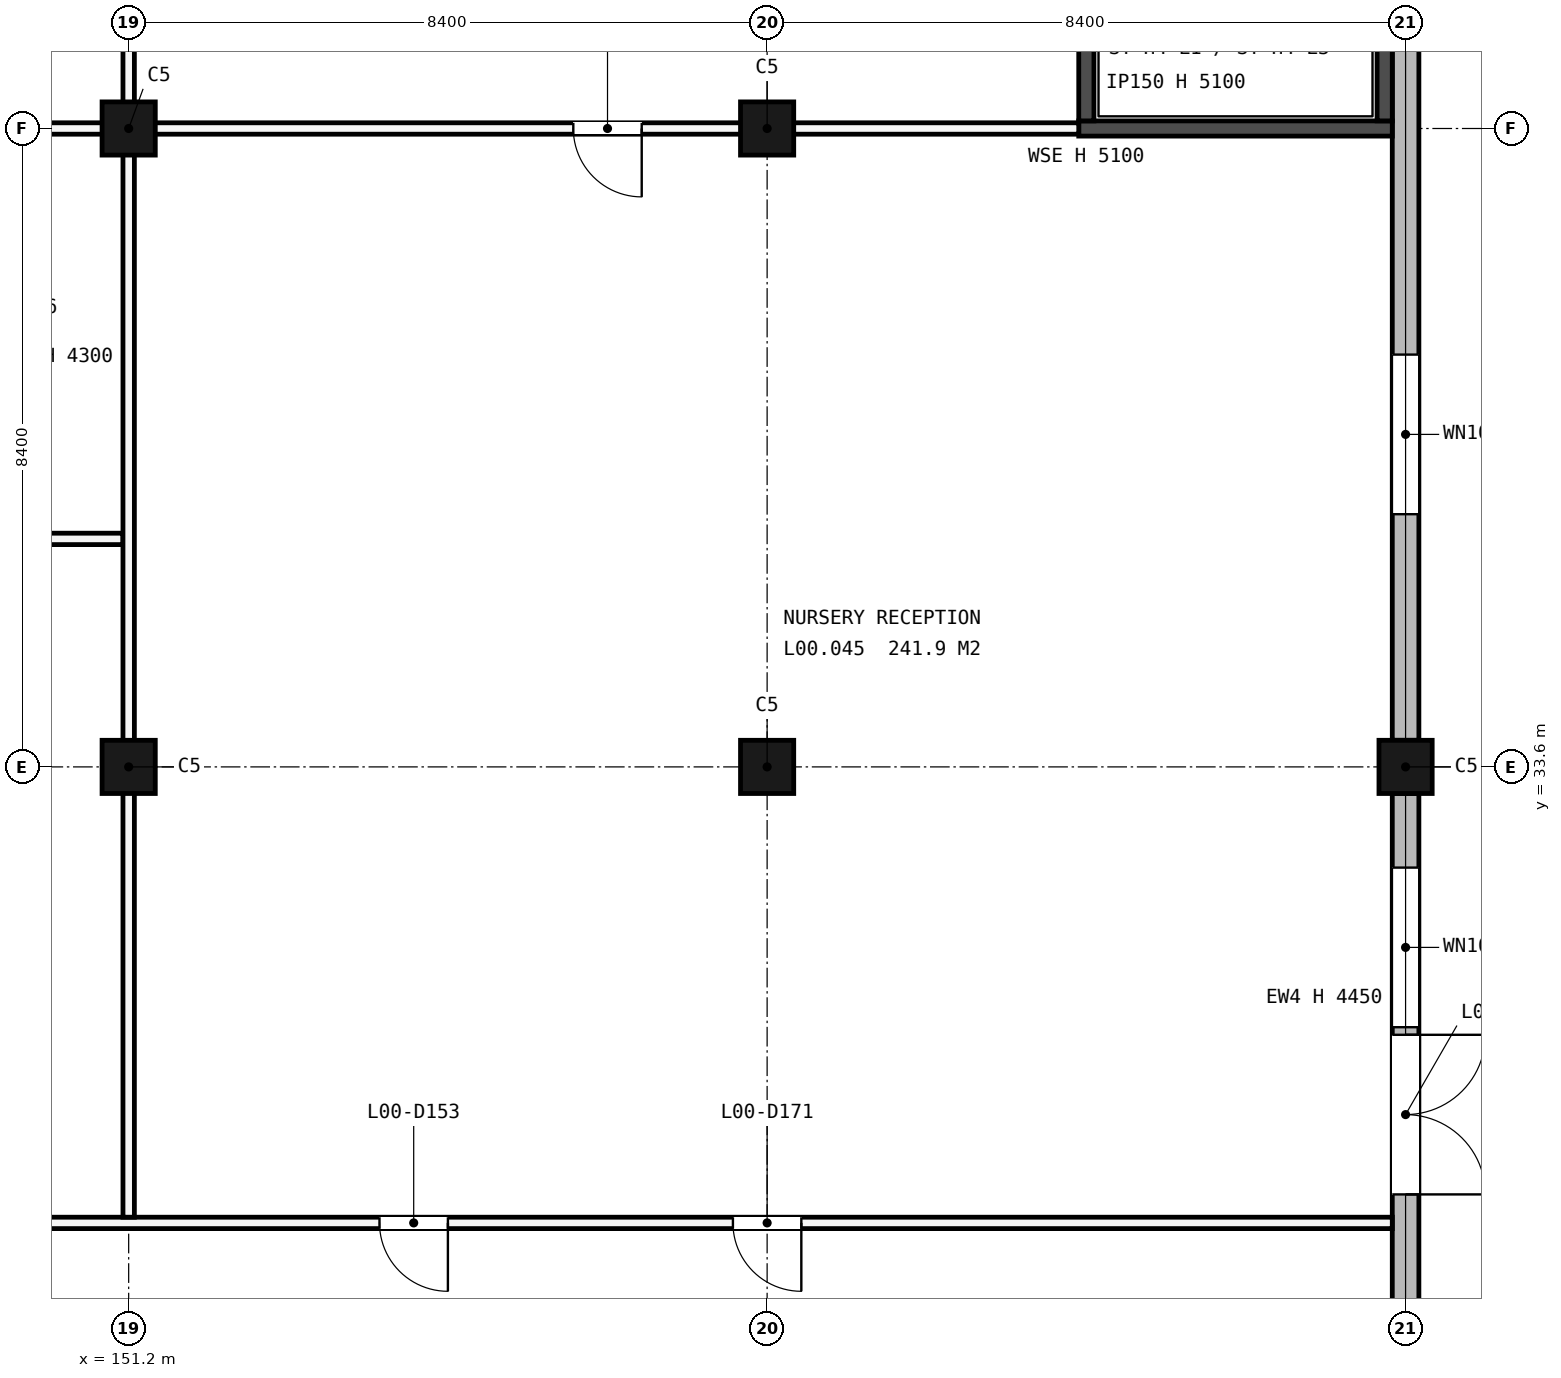
"""IFC4 building model, lengths in metres.
Left out: names, types, materials, properties, quantities, classifications, styles, units other than length and angle.
Written with IfcOpenShell. Run it as: python <this file> out.ifc"""

import sys

from ifc_helpers import new_model, si_unit, direction, frame, frame_2d, origin, origin_2d, place, context, subcontext, project, spatial, rectangle, extrude, element, fill, save


model = new_model("IFC4")
c1 = context("Model", 3, precision=1e-05, world=origin(), true_north=direction((0.0, 1.0)))
c2 = subcontext(c1, "Body", "Model", "MODEL_VIEW")
j1 = project(units=[si_unit("LENGTHUNIT", "METRE"), si_unit("PLANEANGLEUNIT", "RADIAN")], contexts=[c1])
p1 = place(None, origin())
s1 = spatial("IfcSite", under=j1, at=p1, CompositionType="ELEMENT")
p2 = place(p1, origin())
s2 = spatial("IfcBuilding", under=s1, at=p2, CompositionType="ELEMENT")
p3 = place(p2, origin())
s3 = spatial("IfcBuildingStorey", under=s2, at=p3, CompositionType="ELEMENT", Elevation=0.0)
for number, where, z_axis, x_axis in (
    (1, (151.2, 33.6, -0.3), (0.0, 0.0, 1.0), (1.0, 0.0, 0.0)),
    (2, (151.2, 42.0, -0.3), (0.0, 0.0, 1.0), (1.0, 0.0, 0.0)),
    (3, (159.6, 33.6, -0.3), (0.0, 0.0, 1.0), (1.0, 0.0, 0.0)),
    (4, (159.6, 42.0, -0.3), (0.0, 0.0, 1.0), (1.0, 0.0, 0.0)),
    (5, (168.0, 33.6, -0.3), (0.0, 0.0, 1.0), (1.0, 0.0, 0.0)),
):
    element("IfcColumn", number, at=place(p3, frame(where, z_axis=z_axis, x_axis=x_axis)), inside=s3, PredefinedType="COLUMN", context=c2, shape_type="SweptSolid", body=[
        extrude(rectangle(XDim=0.7, YDim=0.7, at=origin_2d()), origin(), (0.0, 0.0, 1.0), 5.4),
    ])
p4 = place(p3, frame((168.0, 25.55, 0.0), z_axis=(0.0, 0.0, 1.0), x_axis=(0.0, 1.0, 0.0)))
e6 = element("IfcWall", 6, at=p4, inside=s3, PredefinedType="STANDARD", context=c2, shape_type="SweptSolid", body=[
    extrude(rectangle(XDim=7.7, YDim=0.35, at=frame_2d((3.85, 0.0))), origin(), (0.0, 0.0, 1.0), 4.45),
])
p5 = place(p4, frame((4.525, 0.0, 0.0), z_axis=(0.0, 0.0, 1.0), x_axis=(-1.0, 0.0, 0.0)))
e7 = element("IfcOpeningElement", 7, at=p5, cuts=e6, PredefinedType="OPENING", context=c2, shape_type="SweptSolid", body=[
    extrude(rectangle(XDim=2.1, YDim=2.2, at=frame_2d((1.05, 1.1))), frame((0.0, 0.185, 0.0), z_axis=(0.0, -1.0, 0.0), x_axis=(1.0, 0.0, 0.0)), (0.0, 0.0, 1.0), 0.37),
])
p6 = place(p4, frame((4.625, 0.0, 0.6)))
e8 = element("IfcOpeningElement", 8, at=p6, cuts=e6, PredefinedType="OPENING", context=c2, shape_type="SweptSolid", body=[
    extrude(rectangle(XDim=2.1, YDim=1.8, at=frame_2d((1.05, 0.9))), frame((0.0, 0.185, 0.0), z_axis=(0.0, -1.0, 0.0), x_axis=(1.0, 0.0, 0.0)), (0.0, 0.0, 1.0), 0.37),
])
p7 = place(p3, frame((168.0, 33.95, 0.0), z_axis=(0.0, 0.0, 1.0), x_axis=(0.0, 1.0, 0.0)))
e9 = element("IfcWall", 9, at=p7, inside=s3, PredefinedType="STANDARD", context=c2, shape_type="SweptSolid", body=[
    extrude(rectangle(XDim=16.45, YDim=0.35, at=frame_2d((8.225, 0.0))), origin(), (0.0, 0.0, 1.0), 5.1),
])
p8 = place(p7, frame((2.975, 0.0, 0.6)))
e10 = element("IfcOpeningElement", 10, at=p8, cuts=e9, PredefinedType="OPENING", context=c2, shape_type="SweptSolid", body=[
    extrude(rectangle(XDim=2.1, YDim=1.8, at=frame_2d((1.05, 0.9))), frame((0.0, 0.185, 0.0), z_axis=(0.0, -1.0, 0.0), x_axis=(1.0, 0.0, 0.0)), (0.0, 0.0, 1.0), 0.37),
])
p9 = place(p3, frame((163.7, 42.0, 0.0), z_axis=(0.0, 0.0, 1.0), x_axis=(1.0, 0.0, 0.0)))
e11 = element("IfcWall", 11, at=p9, inside=s3, PredefinedType="SHEAR", context=c2, shape_type="SweptSolid", body=[
    extrude(rectangle(XDim=4.125, YDim=0.2, at=frame_2d((2.062, 0.0))), origin(), (0.0, 0.0, 1.0), 5.1),
])
for number, where, z_axis, x_axis in (
    (12, (163.8, 42.1, 0.0), (0.0, 0.0, 1.0), (0.0, 1.0, 0.0)),
    (13, (167.725, 42.1, 0.0), (0.0, 0.0, 1.0), (0.0, 1.0, 0.0)),
):
    element("IfcWall", number, at=place(p3, frame(where, z_axis=z_axis, x_axis=x_axis)), inside=s3, PredefinedType="SHEAR", context=c2, shape_type="SweptSolid", body=[
        extrude(rectangle(XDim=7.925, YDim=0.2, at=frame_2d((3.962, 0.0))), origin(), (0.0, 0.0, 1.0), 5.1),
    ])
p10 = place(p3, frame((117.475, 27.6, 0.0), z_axis=(0.0, 0.0, 1.0), x_axis=(1.0, 0.0, 0.0)))
e14 = element("IfcWall", 14, at=p10, inside=s3, PredefinedType="PARTITIONING", context=c2, shape_type="SweptSolid", body=[
    extrude(rectangle(XDim=50.35, YDim=0.15, at=frame_2d((25.175, 0.0))), origin(), (0.0, 0.0, 1.0), 5.1),
])
p11 = place(p10, frame((7.475, 0.0, 0.0)))
e15 = element("IfcOpeningElement", 15, at=p11, cuts=e14, PredefinedType="OPENING", context=c2, shape_type="SweptSolid", body=[
    extrude(rectangle(XDim=2.1, YDim=2.1, at=frame_2d((1.05, 1.05))), frame((0.0, 0.085, 0.0), z_axis=(0.0, -1.0, 0.0), x_axis=(1.0, 0.0, 0.0)), (0.0, 0.0, 1.0), 0.17),
])
p12 = place(p10, frame((20.675, 0.0, 0.0)))
e16 = element("IfcOpeningElement", 16, at=p12, cuts=e14, PredefinedType="OPENING", context=c2, shape_type="SweptSolid", body=[
    extrude(rectangle(XDim=0.9, YDim=2.25, at=frame_2d((0.45, 1.125))), frame((0.0, 0.085, 0.0), z_axis=(0.0, -1.0, 0.0), x_axis=(1.0, 0.0, 0.0)), (0.0, 0.0, 1.0), 0.17),
])
p13 = place(p10, frame((29.075, 0.0, 0.0)))
e17 = element("IfcOpeningElement", 17, at=p13, cuts=e14, PredefinedType="OPENING", context=c2, shape_type="SweptSolid", body=[
    extrude(rectangle(XDim=0.9, YDim=2.25, at=frame_2d((0.45, 1.125))), frame((0.0, 0.085, 0.0), z_axis=(0.0, -1.0, 0.0), x_axis=(1.0, 0.0, 0.0)), (0.0, 0.0, 1.0), 0.17),
])
p14 = place(p10, frame((41.675, 0.0, 0.0)))
e18 = element("IfcOpeningElement", 18, at=p14, cuts=e14, PredefinedType="OPENING", context=c2, shape_type="SweptSolid", body=[
    extrude(rectangle(XDim=0.9, YDim=2.25, at=frame_2d((0.45, 1.125))), frame((0.0, 0.085, 0.0), z_axis=(0.0, -1.0, 0.0), x_axis=(1.0, 0.0, 0.0)), (0.0, 0.0, 1.0), 0.17),
])
p15 = place(p10, frame((37.025, 0.0, 0.0)))
e19 = element("IfcOpeningElement", 19, at=p15, cuts=e14, PredefinedType="OPENING", context=c2, shape_type="SweptSolid", body=[
    extrude(rectangle(XDim=0.9, YDim=2.25, at=frame_2d((0.45, 1.125))), frame((0.0, 0.085, 0.0), z_axis=(0.0, -1.0, 0.0), x_axis=(1.0, 0.0, 0.0)), (0.0, 0.0, 1.0), 0.17),
])
p16 = place(p3, frame((142.875, 36.6, 0.0), z_axis=(0.0, 0.0, 1.0), x_axis=(1.0, 0.0, 0.0)))
e20 = element("IfcWall", 20, at=p16, inside=s3, PredefinedType="PARTITIONING", context=c2, shape_type="SweptSolid", body=[
    extrude(rectangle(XDim=8.25, YDim=0.15, at=frame_2d((4.125, 0.0))), origin(), (0.0, 0.0, 1.0), 5.1),
])
p17 = place(p3, frame((143.13, 42.0, 0.0), z_axis=(0.0, 0.0, 1.0), x_axis=(1.0, 0.0, 0.0)))
e21 = element("IfcWall", 21, at=p17, inside=s3, PredefinedType="PARTITIONING", context=c2, shape_type="SweptSolid", body=[
    extrude(rectangle(XDim=16.14, YDim=0.15, at=frame_2d((8.07, 0.0))), origin(), (0.0, 0.0, 1.0), 4.3),
])
p18 = place(p17, frame((3.42, 0.0, 0.0)))
e22 = element("IfcOpeningElement", 22, at=p18, cuts=e21, PredefinedType="OPENING", context=c2, shape_type="SweptSolid", body=[
    extrude(rectangle(XDim=0.9, YDim=2.1, at=frame_2d((0.45, 1.05))), frame((0.0, 0.085, 0.0), z_axis=(0.0, -1.0, 0.0), x_axis=(1.0, 0.0, 0.0)), (0.0, 0.0, 1.0), 0.17),
])
p19 = place(p17, frame((13.92, 0.0, 0.0)))
e23 = element("IfcOpeningElement", 23, at=p19, cuts=e21, PredefinedType="OPENING", context=c2, shape_type="SweptSolid", body=[
    extrude(rectangle(XDim=0.9, YDim=2.25, at=frame_2d((0.45, 1.125))), frame((0.0, 0.085, 0.0), z_axis=(0.0, -1.0, 0.0), x_axis=(1.0, 0.0, 0.0)), (0.0, 0.0, 1.0), 0.17),
])
p20 = place(p3, frame((159.27, 42.0, 0.0), z_axis=(0.0, 0.0, 1.0), x_axis=(1.0, 0.0, 0.0)))
e24 = element("IfcWall", 24, at=p20, inside=s3, PredefinedType="PARTITIONING", context=c2, shape_type="SweptSolid", body=[
    extrude(rectangle(XDim=4.43, YDim=0.15, at=frame_2d((2.215, 0.0))), origin(), (0.0, 0.0, 1.0), 5.1),
])
p21 = place(p3, frame((151.2, 27.675, 0.0), z_axis=(0.0, 0.0, 1.0), x_axis=(0.0, 1.0, 0.0)))
e25 = element("IfcWall", 25, at=p21, inside=s3, PredefinedType="PARTITIONING", context=c2, shape_type="SweptSolid", body=[
    extrude(rectangle(XDim=22.65, YDim=0.15, at=frame_2d((11.325, 0.0))), origin(), (0.0, 0.0, 1.0), 4.3),
])
p22 = place(p5, origin())
e26 = element("IfcDoor", 26, at=p22, inside=s3, OperationType="SINGLE_SWING_LEFT", PredefinedType="DOOR", context=c2, shape_type="SweptSolid", body=[
    extrude(rectangle(XDim=2.1, YDim=0.013, at=frame_2d((1.05, 0.007))), frame((0.0, 0.115, 0.0), z_axis=(0.0, -1.0, 0.0), x_axis=(1.0, 0.0, 0.0)), (0.0, 0.0, 1.0), 0.23),
    extrude(rectangle(XDim=0.075, YDim=2.112, at=frame_2d((0.038, 1.069))), frame((0.0, 0.125, 0.0), z_axis=(0.0, -1.0, 0.0), x_axis=(1.0, 0.0, 0.0)), (0.0, 0.0, 1.0), 0.25),
    extrude(rectangle(XDim=0.075, YDim=2.112, at=frame_2d((2.062, 1.069))), frame((0.0, 0.125, 0.0), z_axis=(0.0, -1.0, 0.0), x_axis=(1.0, 0.0, 0.0)), (0.0, 0.0, 1.0), 0.25),
    extrude(rectangle(XDim=2.1, YDim=0.075, at=frame_2d((1.05, 2.163))), frame((0.0, 0.115, 0.0), z_axis=(0.0, -1.0, 0.0), x_axis=(1.0, 0.0, 0.0)), (0.0, 0.0, 1.0), 0.23),
    extrude(rectangle(XDim=1.95, YDim=0.3, at=frame_2d((1.05, 0.163))), frame((0.0, 0.02, 0.0), z_axis=(0.0, -1.0, 0.0), x_axis=(1.0, 0.0, 0.0)), (0.0, 0.0, 1.0), 0.04),
    extrude(rectangle(XDim=1.95, YDim=0.12, at=frame_2d((1.05, 2.065))), frame((0.0, 0.02, 0.0), z_axis=(0.0, -1.0, 0.0), x_axis=(1.0, 0.0, 0.0)), (0.0, 0.0, 1.0), 0.04),
    extrude(rectangle(XDim=0.09, YDim=1.692, at=frame_2d((0.12, 1.159))), frame((0.0, 0.025, 0.0), z_axis=(0.0, -1.0, 0.0), x_axis=(1.0, 0.0, 0.0)), (0.0, 0.0, 1.0), 0.05),
    extrude(rectangle(XDim=0.18, YDim=1.692, at=frame_2d((1.05, 1.159))), frame((0.0, 0.025, 0.0), z_axis=(0.0, -1.0, 0.0), x_axis=(1.0, 0.0, 0.0)), (0.0, 0.0, 1.0), 0.05),
    extrude(rectangle(XDim=0.09, YDim=1.692, at=frame_2d((1.98, 1.159))), frame((0.0, 0.025, 0.0), z_axis=(0.0, -1.0, 0.0), x_axis=(1.0, 0.0, 0.0)), (0.0, 0.0, 1.0), 0.05),
    extrude(rectangle(XDim=0.795, YDim=1.692, at=frame_2d((0.562, 1.159))), frame((0.0, 0.012, 0.0), z_axis=(0.0, -1.0, 0.0), x_axis=(1.0, 0.0, 0.0)), (0.0, 0.0, 1.0), 0.024),
    extrude(rectangle(XDim=0.795, YDim=1.692, at=frame_2d((1.538, 1.159))), frame((0.0, 0.012, 0.0), z_axis=(0.0, -1.0, 0.0), x_axis=(1.0, 0.0, 0.0)), (0.0, 0.0, 1.0), 0.024),
])
fill(e7, e26)
p23 = place(p6, origin())
e27 = element("IfcWindow", 27, at=p23, inside=s3, PartitioningType="SINGLE_PANEL", PredefinedType="WINDOW", context=c2, shape_type="SweptSolid", body=[
    extrude(rectangle(XDim=2.1, YDim=1.8, at=frame_2d((1.05, 0.9))), frame((0.0, 0.03, 0.0), z_axis=(0.0, -1.0, 0.0), x_axis=(1.0, 0.0, 0.0)), (0.0, 0.0, 1.0), 0.06),
])
fill(e8, e27)
p24 = place(p8, origin())
e28 = element("IfcWindow", 28, at=p24, inside=s3, PartitioningType="SINGLE_PANEL", PredefinedType="WINDOW", context=c2, shape_type="SweptSolid", body=[
    extrude(rectangle(XDim=2.1, YDim=1.8, at=frame_2d((1.05, 0.9))), frame((0.0, 0.03, 0.0), z_axis=(0.0, -1.0, 0.0), x_axis=(1.0, 0.0, 0.0)), (0.0, 0.0, 1.0), 0.06),
])
fill(e10, e28)
p25 = place(p14, origin())
e29 = element("IfcDoor", 29, at=p25, inside=s3, OperationType="SINGLE_SWING_RIGHT", PredefinedType="DOOR", context=c2, shape_type="SweptSolid", body=[
    extrude(rectangle(XDim=0.9, YDim=2.25, at=frame_2d((0.45, 1.125))), frame((0.0, 0.025, 0.0), z_axis=(0.0, -1.0, 0.0), x_axis=(1.0, 0.0, 0.0)), (0.0, 0.0, 1.0), 0.05),
])
fill(e18, e29)
p26 = place(p15, origin())
e30 = element("IfcDoor", 30, at=p26, inside=s3, OperationType="SINGLE_SWING_RIGHT", PredefinedType="DOOR", context=c2, shape_type="SweptSolid", body=[
    extrude(rectangle(XDim=0.9, YDim=2.25, at=frame_2d((0.45, 1.125))), frame((0.0, 0.025, 0.0), z_axis=(0.0, -1.0, 0.0), x_axis=(1.0, 0.0, 0.0)), (0.0, 0.0, 1.0), 0.05),
])
fill(e19, e30)
p27 = place(p19, origin())
e31 = element("IfcDoor", 31, at=p27, inside=s3, OperationType="SINGLE_SWING_RIGHT", PredefinedType="DOOR", context=c2, shape_type="SweptSolid", body=[
    extrude(rectangle(XDim=0.9, YDim=2.25, at=frame_2d((0.45, 1.125))), frame((0.0, 0.025, 0.0), z_axis=(0.0, -1.0, 0.0), x_axis=(1.0, 0.0, 0.0)), (0.0, 0.0, 1.0), 0.05),
])
fill(e23, e31)
save(model, sys.argv[1])
